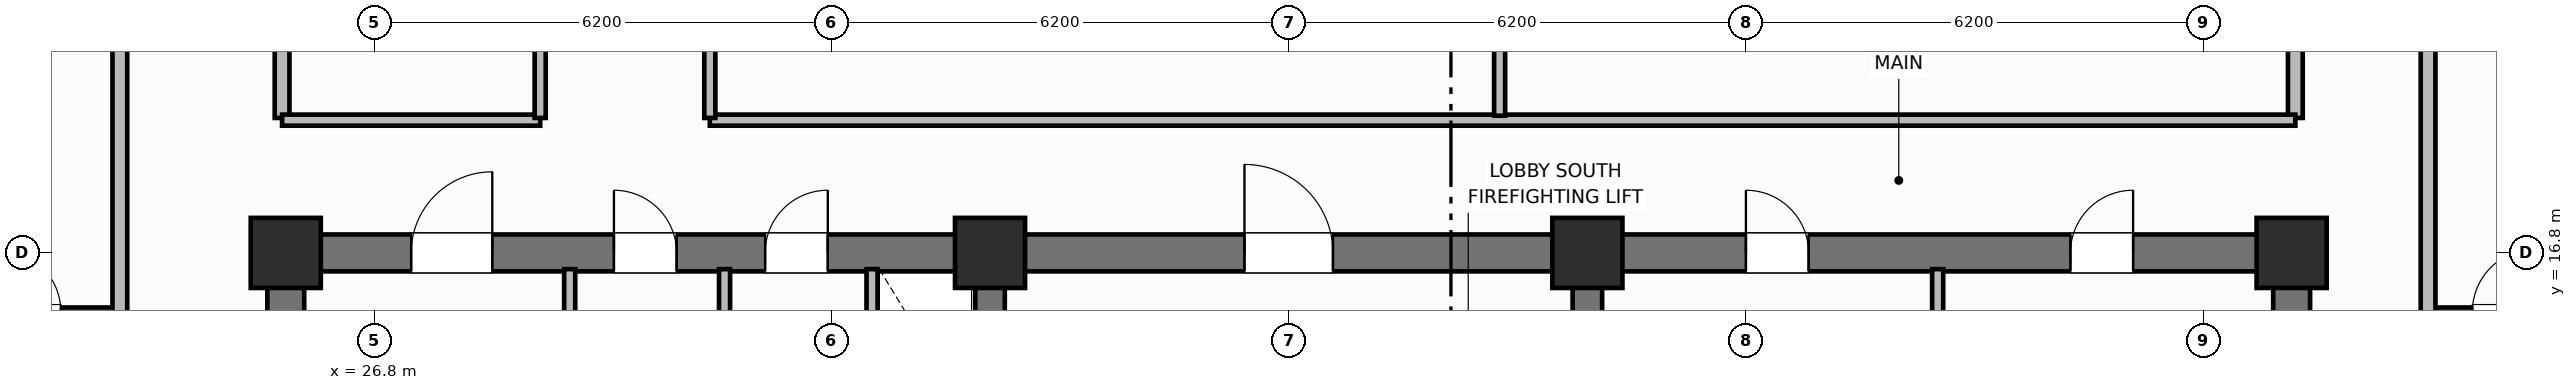
"""IFC4 building model, lengths in metres.
Left out: names, types, materials, properties, quantities, classifications, styles, units other than length and angle.
Written with IfcOpenShell. Run it as: python <this file> out.ifc"""

import sys

from ifc_helpers import new_model, si_unit, direction, frame, frame_2d, origin, origin_2d, place, context, subcontext, project, spatial, rectangle, extrude, element, fill, save


model = new_model("IFC4")
c1 = context("Model", 3, precision=1e-05, world=origin(), true_north=direction((0.0, 1.0)))
c2 = subcontext(c1, "Body", "Model", "MODEL_VIEW")
j1 = project(units=[si_unit("LENGTHUNIT", "METRE"), si_unit("PLANEANGLEUNIT", "RADIAN")], contexts=[c1])
p1 = place(None, origin())
s1 = spatial("IfcSite", under=j1, at=p1, CompositionType="ELEMENT")
p2 = place(p1, origin())
s2 = spatial("IfcBuilding", under=s1, at=p2, CompositionType="ELEMENT")
p3 = place(p2, frame((0.0, 0.0, 162.6)))
s3 = spatial("IfcBuildingStorey", under=s2, at=p3, CompositionType="ELEMENT", Elevation=162.6)
for number, where, z_axis, x_axis in (
    (1, (25.6, 10.85, 0.0), (0.0, 0.0, 1.0), (0.0, 1.0, 0.0)),
    (2, (52.8, 10.85, 0.0), (0.0, 0.0, 1.0), (0.0, 1.0, 0.0)),
):
    element("IfcWall", number, at=place(p3, frame(where, z_axis=z_axis, x_axis=x_axis)), inside=s3, PredefinedType="SHEAR", context=c2, shape_type="SweptSolid", body=[
        extrude(rectangle(XDim=5.7, YDim=0.5, at=frame_2d((2.85, 0.0))), origin(), (0.0, 0.0, 1.0), 3.7),
    ])
p4 = place(p3, frame((25.6, 16.8, 0.0), z_axis=(0.0, 0.0, 1.0), x_axis=(1.0, 0.0, 0.0)))
e3 = element("IfcWall", 3, at=p4, inside=s3, PredefinedType="SHEAR", context=c2, shape_type="SweptSolid", body=[
    extrude(rectangle(XDim=27.2, YDim=0.5, at=frame_2d((13.6, 0.0))), origin(), (0.0, 0.0, 1.0), 3.7),
])
p5 = place(p4, frame((1.7, 0.0, 0.0)))
e4 = element("IfcOpeningElement", 4, at=p5, cuts=e3, PredefinedType="OPENING", context=c2, shape_type="SweptSolid", body=[
    extrude(rectangle(XDim=1.1, YDim=2.15, at=frame_2d((0.55, 1.075))), frame((0.0, 0.26, 0.0), z_axis=(0.0, -1.0, 0.0), x_axis=(1.0, 0.0, 0.0)), (0.0, 0.0, 1.0), 0.52),
])
p6 = place(p4, frame((4.45, 0.0, 0.0)))
e5 = element("IfcOpeningElement", 5, at=p6, cuts=e3, PredefinedType="OPENING", context=c2, shape_type="SweptSolid", body=[
    extrude(rectangle(XDim=0.85, YDim=2.1, at=frame_2d((0.425, 1.05))), frame((0.0, 0.26, 0.0), z_axis=(0.0, -1.0, 0.0), x_axis=(1.0, 0.0, 0.0)), (0.0, 0.0, 1.0), 0.52),
])
p7 = place(p4, frame((6.5, 0.0, 0.0)))
e6 = element("IfcOpeningElement", 6, at=p7, cuts=e3, PredefinedType="OPENING", context=c2, shape_type="SweptSolid", body=[
    extrude(rectangle(XDim=0.85, YDim=2.1, at=frame_2d((0.425, 1.05))), frame((0.0, 0.26, 0.0), z_axis=(0.0, -1.0, 0.0), x_axis=(1.0, 0.0, 0.0)), (0.0, 0.0, 1.0), 0.52),
])
p8 = place(p4, frame((13.0, 0.0, 0.0)))
e7 = element("IfcOpeningElement", 7, at=p8, cuts=e3, PredefinedType="OPENING", context=c2, shape_type="SweptSolid", body=[
    extrude(rectangle(XDim=1.2, YDim=2.15, at=frame_2d((0.6, 1.075))), frame((0.0, 0.26, 0.0), z_axis=(0.0, -1.0, 0.0), x_axis=(1.0, 0.0, 0.0)), (0.0, 0.0, 1.0), 0.52),
])
p9 = place(p4, frame((19.8, 0.0, 0.0)))
e8 = element("IfcOpeningElement", 8, at=p9, cuts=e3, PredefinedType="OPENING", context=c2, shape_type="SweptSolid", body=[
    extrude(rectangle(XDim=0.85, YDim=2.1, at=frame_2d((0.425, 1.05))), frame((0.0, 0.26, 0.0), z_axis=(0.0, -1.0, 0.0), x_axis=(1.0, 0.0, 0.0)), (0.0, 0.0, 1.0), 0.52),
])
p10 = place(p4, frame((24.2, 0.0, 0.0)))
e9 = element("IfcOpeningElement", 9, at=p10, cuts=e3, PredefinedType="OPENING", context=c2, shape_type="SweptSolid", body=[
    extrude(rectangle(XDim=0.85, YDim=2.1, at=frame_2d((0.425, 1.05))), frame((0.0, 0.26, 0.0), z_axis=(0.0, -1.0, 0.0), x_axis=(1.0, 0.0, 0.0)), (0.0, 0.0, 1.0), 0.52),
])
for number, where, z_axis, x_axis in (
    (10, (35.15, 10.85, 0.0), (0.0, 0.0, 1.0), (0.0, 1.0, 0.0)),
    (11, (43.25, 10.85, 0.0), (0.0, 0.0, 1.0), (0.0, 1.0, 0.0)),
):
    element("IfcWall", number, at=place(p3, frame(where, z_axis=z_axis, x_axis=x_axis)), inside=s3, PredefinedType="SHEAR", context=c2, shape_type="SweptSolid", body=[
        extrude(rectangle(XDim=5.7, YDim=0.4, at=frame_2d((2.85, 0.0))), origin(), (0.0, 0.0, 1.0), 3.7),
    ])
for number, where, z_axis, x_axis in (
    (12, (25.6, 16.8, 0.0), (0.0, 0.0, 1.0), (1.0, 0.0, 0.0)),
    (13, (35.15, 16.8, 0.0), (0.0, 0.0, 1.0), (1.0, 0.0, 0.0)),
    (14, (43.25, 16.8, 0.0), (0.0, 0.0, 1.0), (1.0, 0.0, 0.0)),
    (15, (52.8, 16.8, 0.0), (0.0, 0.0, 1.0), (1.0, 0.0, 0.0)),
):
    element("IfcColumn", number, at=place(p3, frame(where, z_axis=z_axis, x_axis=x_axis)), inside=s3, PredefinedType="COLUMN", context=c2, shape_type="SweptSolid", body=[
        extrude(rectangle(XDim=0.95, YDim=0.95, at=origin_2d()), origin(), (0.0, 0.0, 1.0), 3.7),
    ])
for number, where, z_axis, x_axis in (
    (16, (29.45, 14.5, 0.0), (0.0, 0.0, 1.0), (0.0, 1.0, 0.0)),
    (17, (31.55, 14.5, 0.0), (0.0, 0.0, 1.0), (0.0, 1.0, 0.0)),
):
    element("IfcWall", number, at=place(p3, frame(where, z_axis=z_axis, x_axis=x_axis)), inside=s3, PredefinedType="PARTITIONING", context=c2, shape_type="SweptSolid", body=[
        extrude(rectangle(XDim=2.08, YDim=0.15, at=frame_2d((1.04, 0.0))), origin(), (0.0, 0.0, 1.0), 2.55),
    ])
p11 = place(p3, frame((33.55, 14.5, 0.0), z_axis=(0.0, 0.0, 1.0), x_axis=(0.0, 1.0, 0.0)))
e18 = element("IfcWall", 18, at=p11, inside=s3, PredefinedType="PARTITIONING", context=c2, shape_type="SweptSolid", body=[
    extrude(rectangle(XDim=2.08, YDim=0.15, at=frame_2d((1.04, 0.0))), origin(), (0.0, 0.0, 1.0), 2.55),
])
p12 = place(p11, frame((0.55, 0.0, 0.0)))
e19 = element("IfcOpeningElement", 19, at=p12, cuts=e18, PredefinedType="OPENING", context=c2, shape_type="SweptSolid", body=[
    extrude(rectangle(XDim=0.85, YDim=2.05, at=frame_2d((0.425, 1.025))), frame((0.0, 0.085, 0.0), z_axis=(0.0, -1.0, 0.0), x_axis=(1.0, 0.0, 0.0)), (0.0, 0.0, 1.0), 0.17),
])
p13 = place(p3, frame((48.0, 10.95, 0.0), z_axis=(0.0, 0.0, 1.0), x_axis=(0.0, 1.0, 0.0)))
e20 = element("IfcWall", 20, at=p13, inside=s3, PredefinedType="PARTITIONING", context=c2, shape_type="SweptSolid", body=[
    extrude(rectangle(XDim=5.63, YDim=0.15, at=frame_2d((2.815, 0.0))), origin(), (0.0, 0.0, 1.0), 2.55),
])
for number, where, z_axis, x_axis in (
    (21, (25.55, 18.63, 0.0), (0.0, 0.0, 1.0), (0.0, 1.0, 0.0)),
    (22, (52.85, 18.63, 0.0), (0.0, 0.0, 1.0), (0.0, 1.0, 0.0)),
):
    element("IfcWall", number, at=place(p3, frame(where, z_axis=z_axis, x_axis=x_axis)), inside=s3, PredefinedType="PARTITIONING", context=c2, shape_type="SweptSolid", body=[
        extrude(rectangle(XDim=19.14, YDim=0.2, at=frame_2d((9.57, 0.0))), origin(), (0.0, 0.0, 1.0), 2.55),
    ])
p14 = place(p3, frame((25.55, 18.6, 0.0), z_axis=(0.0, 0.0, 1.0), x_axis=(1.0, 0.0, 0.0)))
e23 = element("IfcWall", 23, at=p14, inside=s3, PredefinedType="PARTITIONING", context=c2, shape_type="SweptSolid", body=[
    extrude(rectangle(XDim=3.5, YDim=0.15, at=frame_2d((1.75, 0.0))), origin(), (0.0, 0.0, 1.0), 2.55),
])
p15 = place(p3, frame((31.35, 18.6, 0.0), z_axis=(0.0, 0.0, 1.0), x_axis=(1.0, 0.0, 0.0)))
e24 = element("IfcWall", 24, at=p15, inside=s3, PredefinedType="PARTITIONING", context=c2, shape_type="SweptSolid", body=[
    extrude(rectangle(XDim=21.5, YDim=0.15, at=frame_2d((10.75, 0.0))), origin(), (0.0, 0.0, 1.0), 2.55),
])
p16 = place(p3, frame((42.06, 18.66, 0.0), z_axis=(0.0, 0.0, 1.0), x_axis=(0.0, 1.0, 0.0)))
e25 = element("IfcWall", 25, at=p16, inside=s3, PredefinedType="PARTITIONING", context=c2, shape_type="SweptSolid", body=[
    extrude(rectangle(XDim=19.08, YDim=0.15, at=frame_2d((9.54, 0.0))), origin(), (0.0, 0.0, 1.0), 2.55),
])
p17 = place(p16, frame((6.5, 0.0, 0.0)))
e26 = element("IfcOpeningElement", 26, at=p17, cuts=e25, PredefinedType="OPENING", context=c2, shape_type="SweptSolid", body=[
    extrude(rectangle(XDim=1.0, YDim=2.15, at=frame_2d((0.5, 1.075))), frame((0.0, 0.085, 0.0), z_axis=(0.0, -1.0, 0.0), x_axis=(1.0, 0.0, 0.0)), (0.0, 0.0, 1.0), 0.17),
])
p18 = place(p3, frame((29.05, 18.63, 0.0), z_axis=(0.0, 0.0, 1.0), x_axis=(0.0, 1.0, 0.0)))
e27 = element("IfcWall", 27, at=p18, inside=s3, PredefinedType="PARTITIONING", context=c2, shape_type="SweptSolid", body=[
    extrude(rectangle(XDim=19.14, YDim=0.15, at=frame_2d((9.57, 0.0))), origin(), (0.0, 0.0, 1.0), 2.55),
])
p19 = place(p18, frame((5.5, 0.0, 0.0)))
e28 = element("IfcOpeningElement", 28, at=p19, cuts=e27, PredefinedType="OPENING", context=c2, shape_type="SweptSolid", body=[
    extrude(rectangle(XDim=1.0, YDim=2.15, at=frame_2d((0.5, 1.075))), frame((0.0, 0.085, 0.0), z_axis=(0.0, -1.0, 0.0), x_axis=(1.0, 0.0, 0.0)), (0.0, 0.0, 1.0), 0.17),
])
p20 = place(p3, frame((31.35, 18.63, 0.0), z_axis=(0.0, 0.0, 1.0), x_axis=(0.0, 1.0, 0.0)))
e29 = element("IfcWall", 29, at=p20, inside=s3, PredefinedType="PARTITIONING", context=c2, shape_type="SweptSolid", body=[
    extrude(rectangle(XDim=19.14, YDim=0.15, at=frame_2d((9.57, 0.0))), origin(), (0.0, 0.0, 1.0), 2.55),
])
p21 = place(p20, frame((5.5, 0.0, 0.0)))
e30 = element("IfcOpeningElement", 30, at=p21, cuts=e29, PredefinedType="OPENING", context=c2, shape_type="SweptSolid", body=[
    extrude(rectangle(XDim=1.0, YDim=2.15, at=frame_2d((0.5, 1.075))), frame((0.0, 0.085, 0.0), z_axis=(0.0, -1.0, 0.0), x_axis=(1.0, 0.0, 0.0)), (0.0, 0.0, 1.0), 0.17),
])
p22 = place(p3, frame((21.1, 16.0, 0.0), z_axis=(0.0, 0.0, 1.0), x_axis=(1.0, 0.0, 0.0)))
e31 = element("IfcWall", 31, at=p22, inside=s3, PredefinedType="PARTITIONING", context=c2, shape_type="SweptSolid", body=[
    extrude(rectangle(XDim=2.25, YDim=0.12, at=frame_2d((1.125, 0.0))), origin(), (0.0, 0.0, 1.0), 2.55),
])
p23 = place(p22, frame((0.6, 0.0, 0.0)))
e32 = element("IfcOpeningElement", 32, at=p23, cuts=e31, PredefinedType="OPENING", context=c2, shape_type="SweptSolid", body=[
    extrude(rectangle(XDim=0.85, YDim=2.1, at=frame_2d((0.425, 1.05))), frame((0.0, 0.07, 0.0), z_axis=(0.0, -1.0, 0.0), x_axis=(1.0, 0.0, 0.0)), (0.0, 0.0, 1.0), 0.14),
])
p24 = place(p3, frame((23.35, 10.6, 0.0), z_axis=(0.0, 0.0, 1.0), x_axis=(0.0, 1.0, 0.0)))
e33 = element("IfcWall", 33, at=p24, inside=s3, PredefinedType="PARTITIONING", context=c2, shape_type="SweptSolid", body=[
    extrude(rectangle(XDim=35.2, YDim=0.2, at=frame_2d((17.6, 0.0))), origin(), (0.0, 0.0, 1.0), 2.55),
])
p25 = place(p24, frame((2.65, 0.0, 0.0)))
e34 = element("IfcOpeningElement", 34, at=p25, cuts=e33, PredefinedType="OPENING", context=c2, shape_type="SweptSolid", body=[
    extrude(rectangle(XDim=1.0, YDim=2.15, at=frame_2d((0.5, 1.075))), frame((0.0, 0.11, 0.0), z_axis=(0.0, -1.0, 0.0), x_axis=(1.0, 0.0, 0.0)), (0.0, 0.0, 1.0), 0.22),
])
p26 = place(p24, frame((12.65, 0.0, 0.0)))
e35 = element("IfcOpeningElement", 35, at=p26, cuts=e33, PredefinedType="OPENING", context=c2, shape_type="SweptSolid", body=[
    extrude(rectangle(XDim=1.0, YDim=2.15, at=frame_2d((0.5, 1.075))), frame((0.0, 0.11, 0.0), z_axis=(0.0, -1.0, 0.0), x_axis=(1.0, 0.0, 0.0)), (0.0, 0.0, 1.0), 0.22),
])
p27 = place(p24, frame((23.782, 0.0, 0.0)))
e36 = element("IfcOpeningElement", 36, at=p27, cuts=e33, PredefinedType="OPENING", context=c2, shape_type="SweptSolid", body=[
    extrude(rectangle(XDim=1.0, YDim=2.15, at=frame_2d((0.5, 1.075))), frame((0.0, 0.11, 0.0), z_axis=(0.0, -1.0, 0.0), x_axis=(1.0, 0.0, 0.0)), (0.0, 0.0, 1.0), 0.22),
])
p28 = place(p3, frame((54.65, 16.0, 0.0), z_axis=(0.0, 0.0, 1.0), x_axis=(1.0, 0.0, 0.0)))
e37 = element("IfcWall", 37, at=p28, inside=s3, PredefinedType="PARTITIONING", context=c2, shape_type="SweptSolid", body=[
    extrude(rectangle(XDim=2.25, YDim=0.12, at=frame_2d((1.125, 0.0))), origin(), (0.0, 0.0, 1.0), 2.55),
])
p29 = place(p28, frame((0.6, 0.0, 0.0)))
e38 = element("IfcOpeningElement", 38, at=p29, cuts=e37, PredefinedType="OPENING", context=c2, shape_type="SweptSolid", body=[
    extrude(rectangle(XDim=0.85, YDim=2.1, at=frame_2d((0.425, 1.05))), frame((0.0, 0.07, 0.0), z_axis=(0.0, -1.0, 0.0), x_axis=(1.0, 0.0, 0.0)), (0.0, 0.0, 1.0), 0.14),
])
p30 = place(p3, frame((54.65, 10.6, 0.0), z_axis=(0.0, 0.0, 1.0), x_axis=(0.0, 1.0, 0.0)))
e39 = element("IfcWall", 39, at=p30, inside=s3, PredefinedType="PARTITIONING", context=c2, shape_type="SweptSolid", body=[
    extrude(rectangle(XDim=35.2, YDim=0.2, at=frame_2d((17.6, 0.0))), origin(), (0.0, 0.0, 1.0), 2.55),
])
p31 = place(p30, frame((2.65, 0.0, 0.0)))
e40 = element("IfcOpeningElement", 40, at=p31, cuts=e39, PredefinedType="OPENING", context=c2, shape_type="SweptSolid", body=[
    extrude(rectangle(XDim=1.0, YDim=2.15, at=frame_2d((0.5, 1.075))), frame((0.0, 0.11, 0.0), z_axis=(0.0, -1.0, 0.0), x_axis=(1.0, 0.0, 0.0)), (0.0, 0.0, 1.0), 0.22),
])
p32 = place(p30, frame((22.75, 0.0, 0.0)))
e41 = element("IfcOpeningElement", 41, at=p32, cuts=e39, PredefinedType="OPENING", context=c2, shape_type="SweptSolid", body=[
    extrude(rectangle(XDim=1.0, YDim=2.15, at=frame_2d((0.5, 1.075))), frame((0.0, 0.11, 0.0), z_axis=(0.0, -1.0, 0.0), x_axis=(1.0, 0.0, 0.0)), (0.0, 0.0, 1.0), 0.22),
])
p33 = place(p23, origin())
e42 = element("IfcDoor", 42, at=p33, inside=s3, OperationType="SINGLE_SWING_LEFT", PredefinedType="DOOR", context=c2, shape_type="SweptSolid", body=[
    extrude(rectangle(XDim=0.85, YDim=2.1, at=frame_2d((0.425, 1.05))), frame((0.0, 0.025, 0.0), z_axis=(0.0, -1.0, 0.0), x_axis=(1.0, 0.0, 0.0)), (0.0, 0.0, 1.0), 0.05),
])
fill(e32, e42)
p34 = place(p29, origin())
e43 = element("IfcDoor", 43, at=p34, inside=s3, OperationType="SINGLE_SWING_RIGHT", PredefinedType="DOOR", context=c2, shape_type="SweptSolid", body=[
    extrude(rectangle(XDim=0.85, YDim=2.1, at=frame_2d((0.425, 1.05))), frame((0.0, 0.025, 0.0), z_axis=(0.0, -1.0, 0.0), x_axis=(1.0, 0.0, 0.0)), (0.0, 0.0, 1.0), 0.05),
])
fill(e38, e43)
p35 = place(p5, origin())
e44 = element("IfcDoor", 44, at=p35, inside=s3, OperationType="SINGLE_SWING_RIGHT", PredefinedType="DOOR", context=c2, shape_type="SweptSolid", body=[
    extrude(rectangle(XDim=1.1, YDim=2.15, at=frame_2d((0.55, 1.075))), frame((0.0, 0.025, 0.0), z_axis=(0.0, -1.0, 0.0), x_axis=(1.0, 0.0, 0.0)), (0.0, 0.0, 1.0), 0.05),
])
fill(e4, e44)
p36 = place(p6, origin())
e45 = element("IfcDoor", 45, at=p36, inside=s3, OperationType="SINGLE_SWING_LEFT", PredefinedType="DOOR", context=c2, shape_type="SweptSolid", body=[
    extrude(rectangle(XDim=0.85, YDim=2.1, at=frame_2d((0.425, 1.05))), frame((0.0, 0.025, 0.0), z_axis=(0.0, -1.0, 0.0), x_axis=(1.0, 0.0, 0.0)), (0.0, 0.0, 1.0), 0.05),
])
fill(e5, e45)
p37 = place(p7, origin())
e46 = element("IfcDoor", 46, at=p37, inside=s3, OperationType="SINGLE_SWING_RIGHT", PredefinedType="DOOR", context=c2, shape_type="SweptSolid", body=[
    extrude(rectangle(XDim=0.85, YDim=2.1, at=frame_2d((0.425, 1.05))), frame((0.0, 0.025, 0.0), z_axis=(0.0, -1.0, 0.0), x_axis=(1.0, 0.0, 0.0)), (0.0, 0.0, 1.0), 0.05),
])
fill(e6, e46)
p38 = place(p8, origin())
e47 = element("IfcDoor", 47, at=p38, inside=s3, OperationType="SINGLE_SWING_LEFT", PredefinedType="DOOR", context=c2, shape_type="SweptSolid", body=[
    extrude(rectangle(XDim=1.2, YDim=2.15, at=frame_2d((0.6, 1.075))), frame((0.0, 0.025, 0.0), z_axis=(0.0, -1.0, 0.0), x_axis=(1.0, 0.0, 0.0)), (0.0, 0.0, 1.0), 0.05),
])
fill(e7, e47)
p39 = place(p9, origin())
e48 = element("IfcDoor", 48, at=p39, inside=s3, OperationType="SINGLE_SWING_LEFT", PredefinedType="DOOR", context=c2, shape_type="SweptSolid", body=[
    extrude(rectangle(XDim=0.85, YDim=2.1, at=frame_2d((0.425, 1.05))), frame((0.0, 0.025, 0.0), z_axis=(0.0, -1.0, 0.0), x_axis=(1.0, 0.0, 0.0)), (0.0, 0.0, 1.0), 0.05),
])
fill(e8, e48)
p40 = place(p10, origin())
e49 = element("IfcDoor", 49, at=p40, inside=s3, OperationType="SINGLE_SWING_RIGHT", PredefinedType="DOOR", context=c2, shape_type="SweptSolid", body=[
    extrude(rectangle(XDim=0.85, YDim=2.1, at=frame_2d((0.425, 1.05))), frame((0.0, 0.025, 0.0), z_axis=(0.0, -1.0, 0.0), x_axis=(1.0, 0.0, 0.0)), (0.0, 0.0, 1.0), 0.05),
])
fill(e9, e49)
save(model, sys.argv[1])
